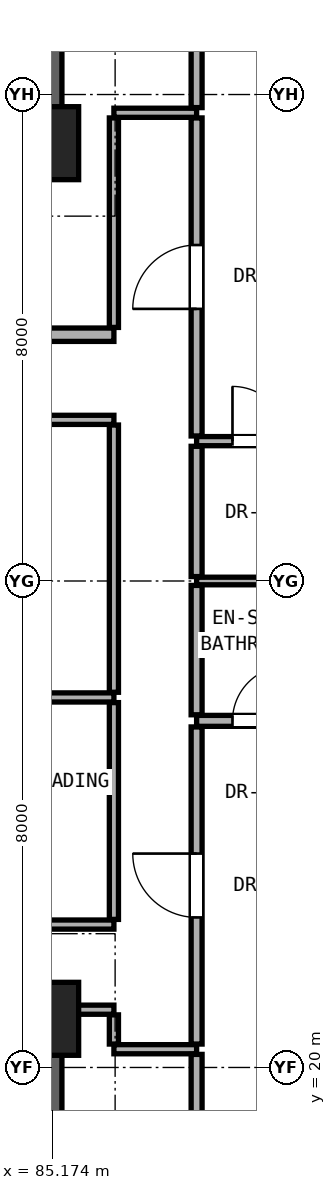
"""IFC4 building model, lengths in metres.
Left out: names, types, materials, properties, quantities, classifications, styles, units other than length and angle.
Written with IfcOpenShell. Run it as: python <this file> out.ifc"""

import sys

from ifc_helpers import new_model, si_unit, direction, frame, frame_2d, origin, origin_2d, place, context, subcontext, project, spatial, rectangle, extrude, element, fill, save


model = new_model("IFC4")
c1 = context("Model", 3, precision=1e-05, world=origin(), true_north=direction((0.0, 1.0)))
c2 = subcontext(c1, "Body", "Model", "MODEL_VIEW")
j1 = project(units=[si_unit("LENGTHUNIT", "METRE"), si_unit("PLANEANGLEUNIT", "RADIAN")], contexts=[c1])
p1 = place(None, origin())
s1 = spatial("IfcSite", under=j1, at=p1, CompositionType="ELEMENT")
p2 = place(p1, origin())
s2 = spatial("IfcBuilding", under=s1, at=p2, CompositionType="ELEMENT")
p3 = place(p2, frame((0.0, 0.0, 104.9)))
s3 = spatial("IfcBuildingStorey", under=s2, at=p3, CompositionType="ELEMENT", Elevation=104.9)
for number, where, z_axis, x_axis in (
    (1, (85.0, 20.8, 0.0), (0.0, 0.0, 1.0), (1.0, 0.0, 0.0)),
    (2, (85.0, 35.2, 0.0), (0.0, 0.0, 1.0), (1.0, 0.0, 0.0)),
):
    element("IfcColumn", number, at=place(p3, frame(where, z_axis=z_axis, x_axis=x_axis)), inside=s3, PredefinedType="COLUMN", context=c2, shape_type="SweptSolid", body=[
        extrude(rectangle(XDim=1.2, YDim=1.2, at=origin_2d()), origin(), (0.0, 0.0, 1.0), 3.3),
    ])
for number, where, z_axis, x_axis in (
    (3, (85.0, 35.2, 0.0), (0.0, 0.0, 1.0), (0.0, 1.0, 0.0)),
    (4, (85.0, 15.2, 0.0), (0.0, 0.0, 1.0), (0.0, 1.0, 0.0)),
):
    element("IfcWall", number, at=place(p3, frame(where, z_axis=z_axis, x_axis=x_axis)), inside=s3, PredefinedType="SHEAR", context=c2, shape_type="SweptSolid", body=[
        extrude(rectangle(XDim=5.6, YDim=0.65, at=frame_2d((2.8, 0.0))), origin(), (0.0, 0.0, 1.0), 3.08),
    ])
p4 = place(p3, frame((86.18, 20.3, 0.0), z_axis=(0.0, 0.0, 1.0), x_axis=(1.0, 0.0, 0.0)))
e5 = element("IfcWall", 5, at=p4, inside=s3, PredefinedType="PARTITIONING", context=c2, shape_type="SweptSolid", body=[
    extrude(rectangle(XDim=1.36, YDim=0.15, at=frame_2d((0.68, 0.0))), origin(), (0.0, 0.0, 1.0), 3.08),
])
p5 = place(p3, frame((85.32, 20.95, 0.0), z_axis=(0.0, 0.0, 1.0), x_axis=(1.0, 0.0, 0.0)))
e6 = element("IfcWall", 6, at=p5, inside=s3, PredefinedType="PARTITIONING", context=c2, shape_type="SweptSolid", body=[
    extrude(rectangle(XDim=0.86, YDim=0.15, at=frame_2d((0.43, 0.0))), origin(), (0.0, 0.0, 1.0), 2.472),
])
p6 = place(p3, frame((66.68, 22.35, 0.0), z_axis=(0.0, 0.0, 1.0), x_axis=(1.0, 0.0, 0.0)))
e7 = element("IfcWall", 7, at=p6, inside=s3, PredefinedType="PARTITIONING", context=c2, shape_type="SweptSolid", body=[
    extrude(rectangle(XDim=19.5, YDim=0.15, at=frame_2d((9.75, 0.0))), origin(), (0.0, 0.0, 1.0), 2.145),
])
p7 = place(p6, frame((8.902, 0.0, 0.0)))
e8 = element("IfcOpeningElement", 8, at=p7, cuts=e7, PredefinedType="OPENING", context=c2, shape_type="SweptSolid", body=[
    extrude(rectangle(XDim=0.85, YDim=2.01, at=frame_2d((0.425, 1.005))), frame((0.0, 0.085, 0.0), z_axis=(0.0, -1.0, 0.0), x_axis=(1.0, 0.0, 0.0)), (0.0, 0.0, 1.0), 0.17),
])
p8 = place(p6, frame((15.947, 0.0, 0.0)))
e9 = element("IfcOpeningElement", 9, at=p8, cuts=e7, PredefinedType="OPENING", context=c2, shape_type="SweptSolid", body=[
    extrude(rectangle(XDim=0.85, YDim=2.01, at=frame_2d((0.425, 1.005))), frame((0.0, 0.085, 0.0), z_axis=(0.0, -1.0, 0.0), x_axis=(1.0, 0.0, 0.0)), (0.0, 0.0, 1.0), 0.17),
])
p9 = place(p3, frame((87.54, 25.7, 0.0), z_axis=(0.0, 0.0, 1.0), x_axis=(1.0, 0.0, 0.0)))
e10 = element("IfcWall", 10, at=p9, inside=s3, PredefinedType="PARTITIONING", context=c2, shape_type="SweptSolid", body=[
    extrude(rectangle(XDim=7.292, YDim=0.18, at=frame_2d((3.646, 0.0))), origin(), (0.0, 0.0, 1.0), 2.216),
])
p10 = place(p9, frame((4.171, 0.0, 0.0)))
e11 = element("IfcOpeningElement", 11, at=p10, cuts=e10, PredefinedType="OPENING", context=c2, shape_type="SweptSolid", body=[
    extrude(rectangle(XDim=0.95, YDim=2.15, at=frame_2d((0.475, 1.075))), frame((0.0, 0.1, 0.0), z_axis=(0.0, -1.0, 0.0), x_axis=(1.0, 0.0, 0.0)), (0.0, 0.0, 1.0), 0.2),
])
p11 = place(p9, frame((0.59, 0.0, 0.0)))
e12 = element("IfcOpeningElement", 12, at=p11, cuts=e10, PredefinedType="OPENING", context=c2, shape_type="SweptSolid", body=[
    extrude(rectangle(XDim=0.9, YDim=2.1, at=frame_2d((0.45, 1.05))), frame((0.0, 0.1, 0.0), z_axis=(0.0, -1.0, 0.0), x_axis=(1.0, 0.0, 0.0)), (0.0, 0.0, 1.0), 0.2),
])
p12 = place(p3, frame((72.05, 26.085, 0.0), z_axis=(0.0, 0.0, 1.0), x_axis=(1.0, 0.0, 0.0)))
e13 = element("IfcWall", 13, at=p12, inside=s3, PredefinedType="PARTITIONING", context=c2, shape_type="SweptSolid", body=[
    extrude(rectangle(XDim=14.13, YDim=0.15, at=frame_2d((7.065, 0.0))), origin(), (0.0, 0.0, 1.0), 2.145),
])
p13 = place(p3, frame((87.54, 28.0, 0.0), z_axis=(0.0, 0.0, 1.0), x_axis=(1.0, 0.0, 0.0)))
e14 = element("IfcWall", 14, at=p13, inside=s3, PredefinedType="PARTITIONING", context=c2, shape_type="SweptSolid", body=[
    extrude(rectangle(XDim=7.292, YDim=0.125, at=frame_2d((3.646, 0.0))), origin(), (0.0, 0.0, 1.0), 2.216),
])
p14 = place(p3, frame((87.54, 30.3, 0.0), z_axis=(0.0, 0.0, 1.0), x_axis=(1.0, 0.0, 0.0)))
e15 = element("IfcWall", 15, at=p14, inside=s3, PredefinedType="PARTITIONING", context=c2, shape_type="SweptSolid", body=[
    extrude(rectangle(XDim=7.292, YDim=0.15, at=frame_2d((3.646, 0.0))), origin(), (0.0, 0.0, 1.0), 2.216),
])
p15 = place(p14, frame((4.171, 0.0, 0.0)))
e16 = element("IfcOpeningElement", 16, at=p15, cuts=e15, PredefinedType="OPENING", context=c2, shape_type="SweptSolid", body=[
    extrude(rectangle(XDim=0.95, YDim=2.15, at=frame_2d((0.475, 1.075))), frame((0.0, 0.085, 0.0), z_axis=(0.0, -1.0, 0.0), x_axis=(1.0, 0.0, 0.0)), (0.0, 0.0, 1.0), 0.17),
])
p16 = place(p14, frame((0.59, 0.0, 0.0)))
e17 = element("IfcOpeningElement", 17, at=p16, cuts=e15, PredefinedType="OPENING", context=c2, shape_type="SweptSolid", body=[
    extrude(rectangle(XDim=0.9, YDim=2.1, at=frame_2d((0.45, 1.05))), frame((0.0, 0.085, 0.0), z_axis=(0.0, -1.0, 0.0), x_axis=(1.0, 0.0, 0.0)), (0.0, 0.0, 1.0), 0.17),
])
p17 = place(p3, frame((66.68, 30.65, 0.0), z_axis=(0.0, 0.0, 1.0), x_axis=(1.0, 0.0, 0.0)))
e18 = element("IfcWall", 18, at=p17, inside=s3, PredefinedType="PARTITIONING", context=c2, shape_type="SweptSolid", body=[
    extrude(rectangle(XDim=19.5, YDim=0.15, at=frame_2d((9.75, 0.0))), origin(), (0.0, 0.0, 1.0), 2.145),
])
p18 = place(p17, frame((3.795, 0.0, 0.0)))
e19 = element("IfcOpeningElement", 19, at=p18, cuts=e18, PredefinedType="OPENING", context=c2, shape_type="SweptSolid", body=[
    extrude(rectangle(XDim=0.85, YDim=2.01, at=frame_2d((0.425, 1.005))), frame((0.0, 0.085, 0.0), z_axis=(0.0, -1.0, 0.0), x_axis=(1.0, 0.0, 0.0)), (0.0, 0.0, 1.0), 0.17),
])
p19 = place(p17, frame((8.902, 0.0, 0.0)))
e20 = element("IfcOpeningElement", 20, at=p19, cuts=e18, PredefinedType="OPENING", context=c2, shape_type="SweptSolid", body=[
    extrude(rectangle(XDim=0.85, YDim=2.01, at=frame_2d((0.425, 1.005))), frame((0.0, 0.085, 0.0), z_axis=(0.0, -1.0, 0.0), x_axis=(1.0, 0.0, 0.0)), (0.0, 0.0, 1.0), 0.17),
])
p20 = place(p17, frame((15.947, 0.0, 0.0)))
e21 = element("IfcOpeningElement", 21, at=p20, cuts=e18, PredefinedType="OPENING", context=c2, shape_type="SweptSolid", body=[
    extrude(rectangle(XDim=0.85, YDim=2.01, at=frame_2d((0.425, 1.005))), frame((0.0, 0.085, 0.0), z_axis=(0.0, -1.0, 0.0), x_axis=(1.0, 0.0, 0.0)), (0.0, 0.0, 1.0), 0.17),
])
p21 = place(p3, frame((71.55, 32.05, 0.0), z_axis=(0.0, 0.0, 1.0), x_axis=(1.0, 0.0, 0.0)))
e22 = element("IfcWall", 22, at=p21, inside=s3, PredefinedType="SOLIDWALL", context=c2, shape_type="SweptSolid", body=[
    extrude(rectangle(XDim=14.63, YDim=0.22, at=frame_2d((7.315, 0.0))), origin(), (0.0, 0.0, 1.0), 2.145),
])
p22 = place(p21, frame((6.065, 0.0, 0.0)))
e23 = element("IfcOpeningElement", 23, at=p22, cuts=e22, PredefinedType="OPENING", context=c2, shape_type="SweptSolid", body=[
    extrude(rectangle(XDim=0.85, YDim=2.01, at=frame_2d((0.425, 1.005))), frame((0.0, 0.12, 0.0), z_axis=(0.0, -1.0, 0.0), x_axis=(1.0, 0.0, 0.0)), (0.0, 0.0, 1.0), 0.24),
])
p23 = place(p21, frame((10.585, 0.0, 0.0)))
e24 = element("IfcOpeningElement", 24, at=p23, cuts=e22, PredefinedType="OPENING", context=c2, shape_type="SweptSolid", body=[
    extrude(rectangle(XDim=0.85, YDim=2.01, at=frame_2d((0.425, 1.005))), frame((0.0, 0.12, 0.0), z_axis=(0.0, -1.0, 0.0), x_axis=(1.0, 0.0, 0.0)), (0.0, 0.0, 1.0), 0.24),
])
p24 = place(p21, frame((0.7, 0.0, 0.0)))
e25 = element("IfcOpeningElement", 25, at=p24, cuts=e22, PredefinedType="OPENING", context=c2, shape_type="SweptSolid", body=[
    extrude(rectangle(XDim=0.85, YDim=2.01, at=frame_2d((0.425, 1.005))), frame((0.0, 0.12, 0.0), z_axis=(0.0, -1.0, 0.0), x_axis=(1.0, 0.0, 0.0)), (0.0, 0.0, 1.0), 0.24),
])
p25 = place(p21, frame((2.55, 0.0, 0.0)))
e26 = element("IfcOpeningElement", 26, at=p25, cuts=e22, PredefinedType="OPENING", context=c2, shape_type="SweptSolid", body=[
    extrude(rectangle(XDim=0.85, YDim=2.01, at=frame_2d((0.425, 1.005))), frame((0.0, 0.12, 0.0), z_axis=(0.0, -1.0, 0.0), x_axis=(1.0, 0.0, 0.0)), (0.0, 0.0, 1.0), 0.24),
])
p26 = place(p3, frame((86.18, 35.7, 0.0), z_axis=(0.0, 0.0, 1.0), x_axis=(1.0, 0.0, 0.0)))
e27 = element("IfcWall", 27, at=p26, inside=s3, PredefinedType="PARTITIONING", context=c2, shape_type="SweptSolid", body=[
    extrude(rectangle(XDim=1.36, YDim=0.15, at=frame_2d((0.68, 0.0))), origin(), (0.0, 0.0, 1.0), 3.08),
])
p27 = place(p3, frame((86.18, 20.385, 0.0), z_axis=(0.0, 0.0, 1.0), x_axis=(0.0, 1.0, 0.0)))
e28 = element("IfcWall", 28, at=p27, inside=s3, PredefinedType="PARTITIONING", context=c2, shape_type="SweptSolid", body=[
    extrude(rectangle(XDim=0.48, YDim=0.15, at=frame_2d((0.24, 0.0))), origin(), (0.0, 0.0, 1.0), 2.472),
])
p28 = place(p3, frame((86.18, 22.435, 0.0), z_axis=(0.0, 0.0, 1.0), x_axis=(0.0, 1.0, 0.0)))
e29 = element("IfcWall", 29, at=p28, inside=s3, PredefinedType="PARTITIONING", context=c2, shape_type="SweptSolid", body=[
    extrude(rectangle(XDim=3.565, YDim=0.15, at=frame_2d((1.782, 0.0))), origin(), (0.0, 0.0, 1.0), 3.08),
])
p29 = place(p3, frame((86.18, 26.17, 0.0), z_axis=(0.0, 0.0, 1.0), x_axis=(0.0, 1.0, 0.0)))
e30 = element("IfcWall", 30, at=p29, inside=s3, PredefinedType="PARTITIONING", context=c2, shape_type="SweptSolid", body=[
    extrude(rectangle(XDim=4.395, YDim=0.15, at=frame_2d((2.198, 0.0))), origin(), (0.0, 0.0, 1.0), 2.299),
])
p30 = place(p3, frame((86.18, 32.17, 0.0), z_axis=(0.0, 0.0, 1.0), x_axis=(0.0, 1.0, 0.0)))
e31 = element("IfcWall", 31, at=p30, inside=s3, PredefinedType="PARTITIONING", context=c2, shape_type="SweptSolid", body=[
    extrude(rectangle(XDim=3.445, YDim=0.15, at=frame_2d((1.723, 0.0))), origin(), (0.0, 0.0, 1.0), 2.472),
])
p31 = place(p3, frame((87.54, 16.602, 0.0), z_axis=(0.0, 0.0, 1.0), x_axis=(0.0, 1.0, 0.0)))
e32 = element("IfcWall", 32, at=p31, inside=s3, PredefinedType="PARTITIONING", context=c2, shape_type="SweptSolid", body=[
    extrude(rectangle(XDim=3.613, YDim=0.18, at=frame_2d((1.807, 0.0))), origin(), (0.0, 0.0, 1.0), 2.456),
])
p32 = place(p3, frame((87.54, 20.385, 0.0), z_axis=(0.0, 0.0, 1.0), x_axis=(0.0, 1.0, 0.0)))
e33 = element("IfcWall", 33, at=p32, inside=s3, PredefinedType="PARTITIONING", context=c2, shape_type="SweptSolid", body=[
    extrude(rectangle(XDim=5.215, YDim=0.18, at=frame_2d((2.607, 0.0))), origin(), (0.0, 0.0, 1.0), 2.472),
])
p33 = place(p32, frame((2.083, 0.0, 0.0)))
e34 = element("IfcOpeningElement", 34, at=p33, cuts=e33, PredefinedType="OPENING", context=c2, shape_type="SweptSolid", body=[
    extrude(rectangle(XDim=1.05, YDim=2.2, at=frame_2d((0.525, 1.1))), frame((0.0, 0.1, 0.0), z_axis=(0.0, -1.0, 0.0), x_axis=(1.0, 0.0, 0.0)), (0.0, 0.0, 1.0), 0.2),
])
p34 = place(p3, frame((87.54, 25.8, 0.0), z_axis=(0.0, 0.0, 1.0), x_axis=(0.0, 1.0, 0.0)))
e35 = element("IfcWall", 35, at=p34, inside=s3, PredefinedType="PARTITIONING", context=c2, shape_type="SweptSolid", body=[
    extrude(rectangle(XDim=2.127, YDim=0.18, at=frame_2d((1.064, 0.0))), origin(), (0.0, 0.0, 1.0), 2.299),
])
p35 = place(p3, frame((87.54, 28.073, 0.0), z_axis=(0.0, 0.0, 1.0), x_axis=(0.0, 1.0, 0.0)))
e36 = element("IfcWall", 36, at=p35, inside=s3, PredefinedType="PARTITIONING", context=c2, shape_type="SweptSolid", body=[
    extrude(rectangle(XDim=2.143, YDim=0.18, at=frame_2d((1.071, 0.0))), origin(), (0.0, 0.0, 1.0), 2.299),
])
p36 = place(p3, frame((87.54, 30.385, 0.0), z_axis=(0.0, 0.0, 1.0), x_axis=(0.0, 1.0, 0.0)))
e37 = element("IfcWall", 37, at=p36, inside=s3, PredefinedType="PARTITIONING", context=c2, shape_type="SweptSolid", body=[
    extrude(rectangle(XDim=5.23, YDim=0.18, at=frame_2d((2.615, 0.0))), origin(), (0.0, 0.0, 1.0), 2.472),
])
p37 = place(p36, frame((2.09, 0.0, 0.0)))
e38 = element("IfcOpeningElement", 38, at=p37, cuts=e37, PredefinedType="OPENING", context=c2, shape_type="SweptSolid", body=[
    extrude(rectangle(XDim=1.05, YDim=2.2, at=frame_2d((0.525, 1.1))), frame((0.0, 0.1, 0.0), z_axis=(0.0, -1.0, 0.0), x_axis=(1.0, 0.0, 0.0)), (0.0, 0.0, 1.0), 0.2),
])
p38 = place(p3, frame((87.54, 35.785, 0.0), z_axis=(0.0, 0.0, 1.0), x_axis=(0.0, 1.0, 0.0)))
e39 = element("IfcWall", 39, at=p38, inside=s3, PredefinedType="PARTITIONING", context=c2, shape_type="SweptSolid", body=[
    extrude(rectangle(XDim=3.628, YDim=0.18, at=frame_2d((1.814, 0.0))), origin(), (0.0, 0.0, 1.0), 2.456),
])
p39 = place(p33, origin())
e40 = element("IfcDoor", 40, at=p39, inside=s3, OperationType="SINGLE_SWING_RIGHT", PredefinedType="DOOR", context=c2, shape_type="SweptSolid", body=[
    extrude(rectangle(XDim=1.05, YDim=2.2, at=frame_2d((0.525, 1.1))), frame((0.0, 0.025, 0.0), z_axis=(0.0, -1.0, 0.0), x_axis=(1.0, 0.0, 0.0)), (0.0, 0.0, 1.0), 0.05),
])
fill(e34, e40)
p40 = place(p11, origin())
e41 = element("IfcDoor", 41, at=p40, inside=s3, OperationType="SINGLE_SWING_RIGHT", PredefinedType="DOOR", context=c2, shape_type="SweptSolid", body=[
    extrude(rectangle(XDim=0.9, YDim=2.1, at=frame_2d((0.45, 1.05))), frame((0.0, 0.025, 0.0), z_axis=(0.0, -1.0, 0.0), x_axis=(1.0, 0.0, 0.0)), (0.0, 0.0, 1.0), 0.05),
])
fill(e12, e41)
p41 = place(p37, origin())
e42 = element("IfcDoor", 42, at=p41, inside=s3, OperationType="SINGLE_SWING_LEFT", PredefinedType="DOOR", context=c2, shape_type="SweptSolid", body=[
    extrude(rectangle(XDim=1.05, YDim=2.2, at=frame_2d((0.525, 1.1))), frame((0.0, 0.025, 0.0), z_axis=(0.0, -1.0, 0.0), x_axis=(1.0, 0.0, 0.0)), (0.0, 0.0, 1.0), 0.05),
])
fill(e38, e42)
p42 = place(p16, origin())
e43 = element("IfcDoor", 43, at=p42, inside=s3, OperationType="SINGLE_SWING_LEFT", PredefinedType="DOOR", context=c2, shape_type="SweptSolid", body=[
    extrude(rectangle(XDim=0.9, YDim=2.1, at=frame_2d((0.45, 1.05))), frame((0.0, 0.025, 0.0), z_axis=(0.0, -1.0, 0.0), x_axis=(1.0, 0.0, 0.0)), (0.0, 0.0, 1.0), 0.05),
])
fill(e17, e43)
save(model, sys.argv[1])
